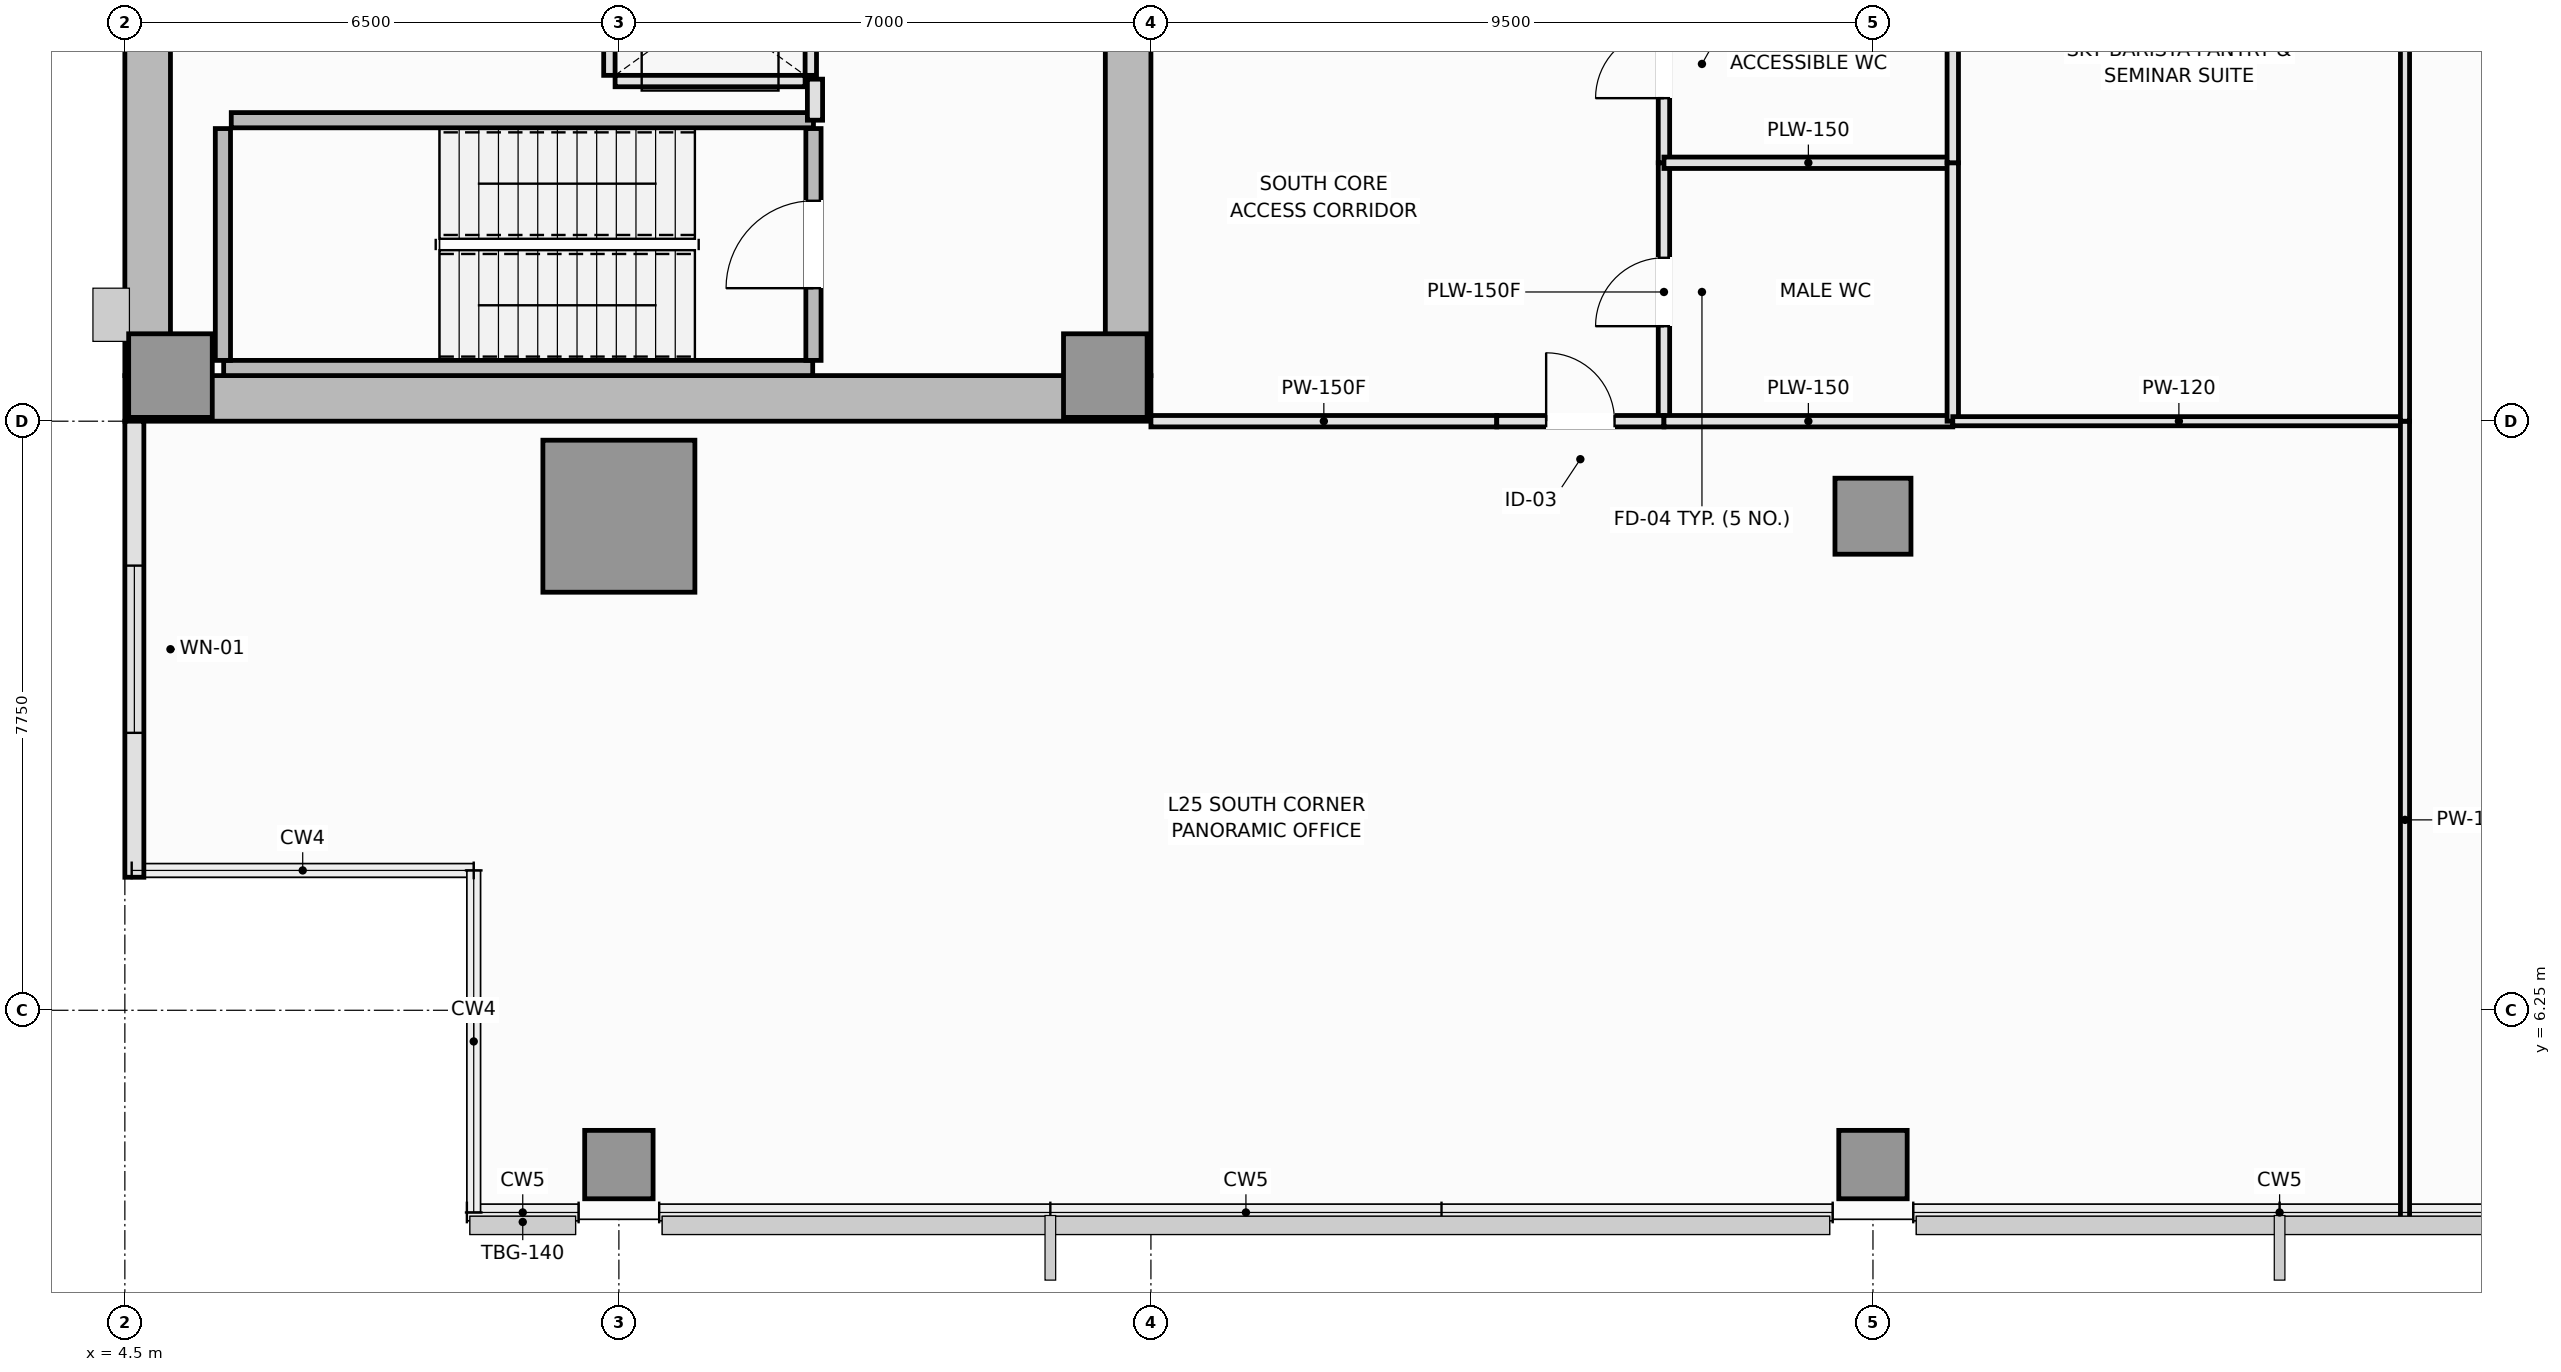
"""IFC4 building model, lengths in metres.
Left out: names, types, materials, properties, quantities, classifications, styles, units other than length and angle.
Written with IfcOpenShell. Run it as: python <this file> out.ifc"""

import sys

from ifc_helpers import new_model, si_unit, direction, frame, frame_2d, origin, origin_2d, place, context, subcontext, project, spatial, rectangle, extrude, element, fill, save


model = new_model("IFC4")
c1 = context("Model", 3, precision=1e-05, world=origin(), true_north=direction((0.0, 1.0)))
c2 = subcontext(c1, "Body", "Model", "MODEL_VIEW")
j1 = project(units=[si_unit("LENGTHUNIT", "METRE"), si_unit("PLANEANGLEUNIT", "RADIAN")], contexts=[c1])
p1 = place(None, origin())
s1 = spatial("IfcSite", under=j1, at=p1, CompositionType="ELEMENT")
p2 = place(p1, origin())
s2 = spatial("IfcBuilding", under=s1, at=p2, CompositionType="ELEMENT")
p3 = place(p2, frame((0.0, 0.0, 97.85)))
s3 = spatial("IfcBuildingStorey", under=s2, at=p3, CompositionType="ELEMENT", Elevation=97.85)
p4 = place(p3, frame((4.5, 14.3, 0.0), z_axis=(0.0, 0.0, 1.0), x_axis=(1.0, 0.0, 0.0)))
e1 = element("IfcWall", 1, at=p4, inside=s3, PredefinedType="SHEAR", context=c2, shape_type="SweptSolid", body=[
    extrude(rectangle(XDim=13.5, YDim=0.6, at=frame_2d((6.75, 0.0))), origin(), (0.0, 0.0, 1.0), 4.4),
])
p5 = place(p3, frame((4.8, 14.6, 0.0), z_axis=(0.0, 0.0, 1.0), x_axis=(0.0, 1.0, 0.0)))
e2 = element("IfcWall", 2, at=p5, inside=s3, PredefinedType="SHEAR", context=c2, shape_type="SweptSolid", body=[
    extrude(rectangle(XDim=21.3, YDim=0.6, at=frame_2d((10.65, 0.0))), origin(), (0.0, 0.0, 1.0), 4.4),
])
p6 = place(p3, frame((17.7, 14.6, 0.0), z_axis=(0.0, 0.0, 1.0), x_axis=(0.0, 1.0, 0.0)))
e3 = element("IfcWall", 3, at=p6, inside=s3, PredefinedType="SHEAR", context=c2, shape_type="SweptSolid", body=[
    extrude(rectangle(XDim=8.85, YDim=0.6, at=frame_2d((4.425, 0.0))), origin(), (0.0, 0.0, 1.0), 4.4),
])
p7 = place(p6, frame((4.3, 0.0, 0.0)))
e4 = element("IfcOpeningElement", 4, at=p7, cuts=e3, PredefinedType="OPENING", context=c2, shape_type="SweptSolid", body=[
    extrude(rectangle(XDim=1.1, YDim=2.15, at=frame_2d((0.55, 1.075))), frame((0.0, 0.31, 0.0), z_axis=(0.0, -1.0, 0.0), x_axis=(1.0, 0.0, 0.0)), (0.0, 0.0, 1.0), 0.62),
])
for number, where, z_axis, x_axis in (
    (5, (5.1, 14.6, 0.0), (0.0, 0.0, 1.0), (1.0, 0.0, 0.0)),
    (6, (17.4, 14.6, 0.0), (0.0, 0.0, 1.0), (1.0, 0.0, 0.0)),
):
    element("IfcColumn", number, at=place(p3, frame(where, z_axis=z_axis, x_axis=x_axis)), inside=s3, PredefinedType="PILASTER", context=c2, shape_type="SweptSolid", body=[
        extrude(rectangle(XDim=1.1, YDim=1.1, at=origin_2d()), origin(), (0.0, 0.0, 1.0), 4.4),
    ])
p8 = place(p3, frame((11.0, 12.75, 0.0), z_axis=(0.0, 0.0, 1.0), x_axis=(1.0, 0.0, 0.0)))
e7 = element("IfcColumn", 7, at=p8, inside=s3, PredefinedType="COLUMN", context=c2, shape_type="SweptSolid", body=[
    extrude(rectangle(XDim=2.0, YDim=2.0, at=origin_2d()), origin(), (0.0, 0.0, 1.0), 4.4),
])
p9 = place(p3, frame((27.5, 12.75, 0.0), z_axis=(0.0, 0.0, 1.0), x_axis=(1.0, 0.0, 0.0)))
e8 = element("IfcColumn", 8, at=p9, inside=s3, PredefinedType="COLUMN", context=c2, shape_type="SweptSolid", body=[
    extrude(rectangle(XDim=1.0, YDim=1.0, at=origin_2d()), origin(), (0.0, 0.0, 1.0), 4.4),
])
for number, where, z_axis, x_axis in (
    (9, (11.0, 4.22, 0.0), (0.0, 0.0, 1.0), (1.0, 0.0, 0.0)),
    (10, (27.5, 4.22, 0.0), (0.0, 0.0, 1.0), (1.0, 0.0, 0.0)),
):
    element("IfcColumn", number, at=place(p3, frame(where, z_axis=z_axis, x_axis=x_axis)), inside=s3, PredefinedType="COLUMN", context=c2, shape_type="SweptSolid", body=[
        extrude(rectangle(XDim=0.9, YDim=0.9, at=origin_2d()), origin(), (0.0, 0.0, 1.0), 4.4),
    ])
p10 = place(p3, frame((4.625, 14.0, 0.0), z_axis=(0.0, 0.0, 1.0), x_axis=(0.0, -1.0, 0.0)))
e11 = element("IfcWall", 11, at=p10, inside=s3, PredefinedType="SOLIDWALL", context=c2, shape_type="SweptSolid", body=[
    extrude(rectangle(XDim=6.0, YDim=0.25, at=frame_2d((3.0, 0.0))), origin(), (0.0, 0.0, 1.0), 4.22),
])
p11 = place(p10, frame((1.9, 0.0, 0.9)))
e12 = element("IfcOpeningElement", 12, at=p11, cuts=e11, PredefinedType="OPENING", context=c2, shape_type="SweptSolid", body=[
    extrude(rectangle(XDim=2.2, YDim=1.8, at=frame_2d((1.1, 0.9))), frame((0.0, 0.135, 0.0), z_axis=(0.0, -1.0, 0.0), x_axis=(1.0, 0.0, 0.0)), (0.0, 0.0, 1.0), 0.27),
])
p12 = place(p3, frame((5.8, 14.7, 0.0), z_axis=(0.0, 0.0, 1.0), x_axis=(1.0, 0.0, 0.0)))
e13 = element("IfcWall", 13, at=p12, inside=s3, PredefinedType="SOLIDWALL", context=c2, shape_type="SweptSolid", body=[
    extrude(rectangle(XDim=7.75, YDim=0.2, at=frame_2d((3.875, 0.0))), origin(), (0.0, 0.0, 1.0), 4.4),
])
p13 = place(p3, frame((5.79, 14.8, 0.0), z_axis=(0.0, 0.0, 1.0), x_axis=(0.0, 1.0, 0.0)))
e14 = element("IfcWall", 14, at=p13, inside=s3, PredefinedType="SOLIDWALL", context=c2, shape_type="SweptSolid", body=[
    extrude(rectangle(XDim=3.05, YDim=0.2, at=frame_2d((1.525, 0.0))), origin(), (0.0, 0.0, 1.0), 4.4),
])
p14 = place(p3, frame((5.9, 17.96, 0.0), z_axis=(0.0, 0.0, 1.0), x_axis=(1.0, 0.0, 0.0)))
e15 = element("IfcWall", 15, at=p14, inside=s3, PredefinedType="SOLIDWALL", context=c2, shape_type="SweptSolid", body=[
    extrude(rectangle(XDim=7.66, YDim=0.2, at=frame_2d((3.83, 0.0))), origin(), (0.0, 0.0, 1.0), 4.4),
])
p15 = place(p3, frame((13.56, 14.8, 0.0), z_axis=(0.0, 0.0, 1.0), x_axis=(0.0, 1.0, 0.0)))
e16 = element("IfcWall", 16, at=p15, inside=s3, PredefinedType="SOLIDWALL", context=c2, shape_type="SweptSolid", body=[
    extrude(rectangle(XDim=3.05, YDim=0.2, at=frame_2d((1.525, 0.0))), origin(), (0.0, 0.0, 1.0), 4.4),
])
p16 = place(p15, frame((0.95, 0.0, 0.0)))
e17 = element("IfcOpeningElement", 17, at=p16, cuts=e16, PredefinedType="OPENING", context=c2, shape_type="SweptSolid", body=[
    extrude(rectangle(XDim=1.15, YDim=2.15, at=frame_2d((0.575, 1.075))), frame((0.0, 0.11, 0.0), z_axis=(0.0, -1.0, 0.0), x_axis=(1.0, 0.0, 0.0)), (0.0, 0.0, 1.0), 0.22),
])
p17 = place(p3, frame((10.95, 18.475, 0.0), z_axis=(0.0, 0.0, 1.0), x_axis=(1.0, 0.0, 0.0)))
e18 = element("IfcWall", 18, at=p17, inside=s3, PredefinedType="PARTITIONING", context=c2, shape_type="SweptSolid", body=[
    extrude(rectangle(XDim=2.5, YDim=0.15, at=frame_2d((1.25, 0.0))), origin(), (0.0, 0.0, 1.0), 4.22),
])
p18 = place(p3, frame((10.875, 18.55, 0.0), z_axis=(0.0, 0.0, 1.0), x_axis=(0.0, 1.0, 0.0)))
e19 = element("IfcWall", 19, at=p18, inside=s3, PredefinedType="PARTITIONING", context=c2, shape_type="SweptSolid", body=[
    extrude(rectangle(XDim=1.8, YDim=0.15, at=frame_2d((0.9, 0.0))), origin(), (0.0, 0.0, 1.0), 4.22),
])
p19 = place(p3, frame((13.525, 18.55, 0.0), z_axis=(0.0, 0.0, 1.0), x_axis=(0.0, 1.0, 0.0)))
e20 = element("IfcWall", 20, at=p19, inside=s3, PredefinedType="PARTITIONING", context=c2, shape_type="SweptSolid", body=[
    extrude(rectangle(XDim=1.8, YDim=0.15, at=frame_2d((0.9, 0.0))), origin(), (0.0, 0.0, 1.0), 4.22),
])
p20 = place(p19, frame((0.35, 0.0, 0.0)))
e21 = element("IfcOpeningElement", 21, at=p20, cuts=e20, PredefinedType="OPENING", context=c2, shape_type="SweptSolid", body=[
    extrude(rectangle(XDim=1.1, YDim=2.2, at=frame_2d((0.55, 1.1))), frame((0.0, 0.085, 0.0), z_axis=(0.0, -1.0, 0.0), x_axis=(1.0, 0.0, 0.0)), (0.0, 0.0, 1.0), 0.17),
])
p21 = place(p3, frame((13.58, 17.96, 0.0), z_axis=(0.0, 0.0, 1.0), x_axis=(0.0, 1.0, 0.0)))
e22 = element("IfcWall", 22, at=p21, inside=s3, PredefinedType="PARTITIONING", context=c2, shape_type="SweptSolid", body=[
    extrude(rectangle(XDim=0.54, YDim=0.2, at=frame_2d((0.27, 0.0))), origin(), (0.0, 0.0, 1.0), 4.22),
])
p22 = place(p3, frame((18.0, 14.0, 0.0), z_axis=(0.0, 0.0, 1.0), x_axis=(1.0, 0.0, 0.0)))
e23 = element("IfcWall", 23, at=p22, inside=s3, PredefinedType="PARTITIONING", context=c2, shape_type="SweptSolid", body=[
    extrude(rectangle(XDim=4.55, YDim=0.15, at=frame_2d((2.275, 0.0))), origin(), (0.0, 0.0, 1.0), 4.22),
])
p23 = place(p3, frame((24.75, 14.0, 0.0), z_axis=(0.0, 0.0, 1.0), x_axis=(0.0, 1.0, 0.0)))
e24 = element("IfcWall", 24, at=p23, inside=s3, PredefinedType="PLUMBINGWALL", context=c2, shape_type="SweptSolid", body=[
    extrude(rectangle(XDim=3.4, YDim=0.15, at=frame_2d((1.7, 0.0))), origin(), (0.0, 0.0, 1.0), 4.22),
])
p24 = place(p23, frame((1.25, 0.0, 0.0)))
e25 = element("IfcOpeningElement", 25, at=p24, cuts=e24, PredefinedType="OPENING", context=c2, shape_type="SweptSolid", body=[
    extrude(rectangle(XDim=0.9, YDim=2.1, at=frame_2d((0.45, 1.05))), frame((0.0, 0.085, 0.0), z_axis=(0.0, -1.0, 0.0), x_axis=(1.0, 0.0, 0.0)), (0.0, 0.0, 1.0), 0.17),
])
p25 = place(p3, frame((24.75, 17.4, 0.0), z_axis=(0.0, 0.0, 1.0), x_axis=(0.0, 1.0, 0.0)))
e26 = element("IfcWall", 26, at=p25, inside=s3, PredefinedType="PLUMBINGWALL", context=c2, shape_type="SweptSolid", body=[
    extrude(rectangle(XDim=2.6, YDim=0.15, at=frame_2d((1.3, 0.0))), origin(), (0.0, 0.0, 1.0), 4.22),
])
p26 = place(p25, frame((0.85, 0.0, 0.0)))
e27 = element("IfcOpeningElement", 27, at=p26, cuts=e26, PredefinedType="OPENING", context=c2, shape_type="SweptSolid", body=[
    extrude(rectangle(XDim=0.9, YDim=2.1, at=frame_2d((0.45, 1.05))), frame((0.0, 0.085, 0.0), z_axis=(0.0, -1.0, 0.0), x_axis=(1.0, 0.0, 0.0)), (0.0, 0.0, 1.0), 0.17),
])
p27 = place(p3, frame((22.55, 14.0, 0.0), z_axis=(0.0, 0.0, 1.0), x_axis=(1.0, 0.0, 0.0)))
e28 = element("IfcWall", 28, at=p27, inside=s3, PredefinedType="PARTITIONING", context=c2, shape_type="SweptSolid", body=[
    extrude(rectangle(XDim=2.2, YDim=0.15, at=frame_2d((1.1, 0.0))), origin(), (0.0, 0.0, 1.0), 4.22),
])
p28 = place(p27, frame((0.65, 0.0, 0.0)))
e29 = element("IfcOpeningElement", 29, at=p28, cuts=e28, PredefinedType="OPENING", context=c2, shape_type="SweptSolid", body=[
    extrude(rectangle(XDim=0.9, YDim=2.1, at=frame_2d((0.45, 1.05))), frame((0.0, 0.085, 0.0), z_axis=(0.0, -1.0, 0.0), x_axis=(1.0, 0.0, 0.0)), (0.0, 0.0, 1.0), 0.17),
])
for number, where, z_axis, x_axis in (
    (30, (24.75, 17.4, 0.0), (0.0, 0.0, 1.0), (1.0, 0.0, 0.0)),
    (31, (24.75, 14.0, 0.0), (0.0, 0.0, 1.0), (1.0, 0.0, 0.0)),
):
    element("IfcWall", number, at=place(p3, frame(where, z_axis=z_axis, x_axis=x_axis)), inside=s3, PredefinedType="PLUMBINGWALL", context=c2, shape_type="SweptSolid", body=[
        extrude(rectangle(XDim=3.8, YDim=0.15, at=frame_2d((1.9, 0.0))), origin(), (0.0, 0.0, 1.0), 4.22),
    ])
p29 = place(p3, frame((28.55, 14.0, 0.0), z_axis=(0.0, 0.0, 1.0), x_axis=(0.0, 1.0, 0.0)))
e32 = element("IfcWall", 32, at=p29, inside=s3, PredefinedType="PLUMBINGWALL", context=c2, shape_type="SweptSolid", body=[
    extrude(rectangle(XDim=3.4, YDim=0.15, at=frame_2d((1.7, 0.0))), origin(), (0.0, 0.0, 1.0), 4.22),
])
p30 = place(p3, frame((28.55, 17.4, 0.0), z_axis=(0.0, 0.0, 1.0), x_axis=(0.0, 1.0, 0.0)))
e33 = element("IfcWall", 33, at=p30, inside=s3, PredefinedType="PLUMBINGWALL", context=c2, shape_type="SweptSolid", body=[
    extrude(rectangle(XDim=2.6, YDim=0.15, at=frame_2d((1.3, 0.0))), origin(), (0.0, 0.0, 1.0), 4.22),
])
p31 = place(p3, frame((28.55, 14.0, 0.0), z_axis=(0.0, 0.0, 1.0), x_axis=(1.0, 0.0, 0.0)))
e34 = element("IfcWall", 34, at=p31, inside=s3, PredefinedType="PARTITIONING", context=c2, shape_type="SweptSolid", body=[
    extrude(rectangle(XDim=5.95, YDim=0.12, at=frame_2d((2.975, 0.0))), origin(), (0.0, 0.0, 1.0), 4.22),
])
p32 = place(p3, frame((34.5, 3.51, 0.0), z_axis=(0.0, 0.0, 1.0), x_axis=(0.0, 1.0, 0.0)))
e35 = element("IfcWall", 35, at=p32, inside=s3, PredefinedType="PARTITIONING", context=c2, shape_type="SweptSolid", body=[
    extrude(rectangle(XDim=10.49, YDim=0.12, at=frame_2d((5.245, 0.0))), origin(), (0.0, 0.0, 1.0), 3.82),
])
p33 = place(p3, frame((34.5, 14.0, 0.0), z_axis=(0.0, 0.0, 1.0), x_axis=(0.0, 1.0, 0.0)))
e36 = element("IfcWall", 36, at=p33, inside=s3, PredefinedType="PARTITIONING", context=c2, shape_type="SweptSolid", body=[
    extrude(rectangle(XDim=9.8, YDim=0.12, at=frame_2d((4.9, 0.0))), origin(), (0.0, 0.0, 1.0), 4.22),
])
p34 = place(p11, origin())
e37 = element("IfcWindow", 37, at=p34, inside=s3, PartitioningType="SINGLE_PANEL", PredefinedType="WINDOW", context=c2, shape_type="SweptSolid", body=[
    extrude(rectangle(XDim=2.2, YDim=1.8, at=frame_2d((1.1, 0.9))), frame((0.0, 0.03, 0.0), z_axis=(0.0, -1.0, 0.0), x_axis=(1.0, 0.0, 0.0)), (0.0, 0.0, 1.0), 0.06),
])
fill(e12, e37)
p35 = place(p16, origin())
e38 = element("IfcDoor", 38, at=p35, inside=s3, OperationType="SINGLE_SWING_LEFT", PredefinedType="DOOR", context=c2, shape_type="SweptSolid", body=[
    extrude(rectangle(XDim=1.15, YDim=2.15, at=frame_2d((0.575, 1.075))), frame((0.0, 0.025, 0.0), z_axis=(0.0, -1.0, 0.0), x_axis=(1.0, 0.0, 0.0)), (0.0, 0.0, 1.0), 0.05),
])
fill(e17, e38)
p36 = place(p24, origin())
e39 = element("IfcDoor", 39, at=p36, inside=s3, OperationType="SINGLE_SWING_LEFT", PredefinedType="DOOR", context=c2, shape_type="SweptSolid", body=[
    extrude(rectangle(XDim=0.9, YDim=2.1, at=frame_2d((0.45, 1.05))), frame((0.0, 0.025, 0.0), z_axis=(0.0, -1.0, 0.0), x_axis=(1.0, 0.0, 0.0)), (0.0, 0.0, 1.0), 0.05),
])
fill(e25, e39)
p37 = place(p26, origin())
e40 = element("IfcDoor", 40, at=p37, inside=s3, OperationType="SINGLE_SWING_LEFT", PredefinedType="DOOR", context=c2, shape_type="SweptSolid", body=[
    extrude(rectangle(XDim=0.9, YDim=2.1, at=frame_2d((0.45, 1.05))), frame((0.0, 0.025, 0.0), z_axis=(0.0, -1.0, 0.0), x_axis=(1.0, 0.0, 0.0)), (0.0, 0.0, 1.0), 0.05),
])
fill(e27, e40)
p38 = place(p28, origin())
e41 = element("IfcDoor", 41, at=p38, inside=s3, OperationType="SINGLE_SWING_LEFT", PredefinedType="DOOR", context=c2, shape_type="SweptSolid", body=[
    extrude(rectangle(XDim=0.9, YDim=2.1, at=frame_2d((0.45, 1.05))), frame((0.0, 0.025, 0.0), z_axis=(0.0, -1.0, 0.0), x_axis=(1.0, 0.0, 0.0)), (0.0, 0.0, 1.0), 0.05),
])
fill(e29, e41)
save(model, sys.argv[1])
